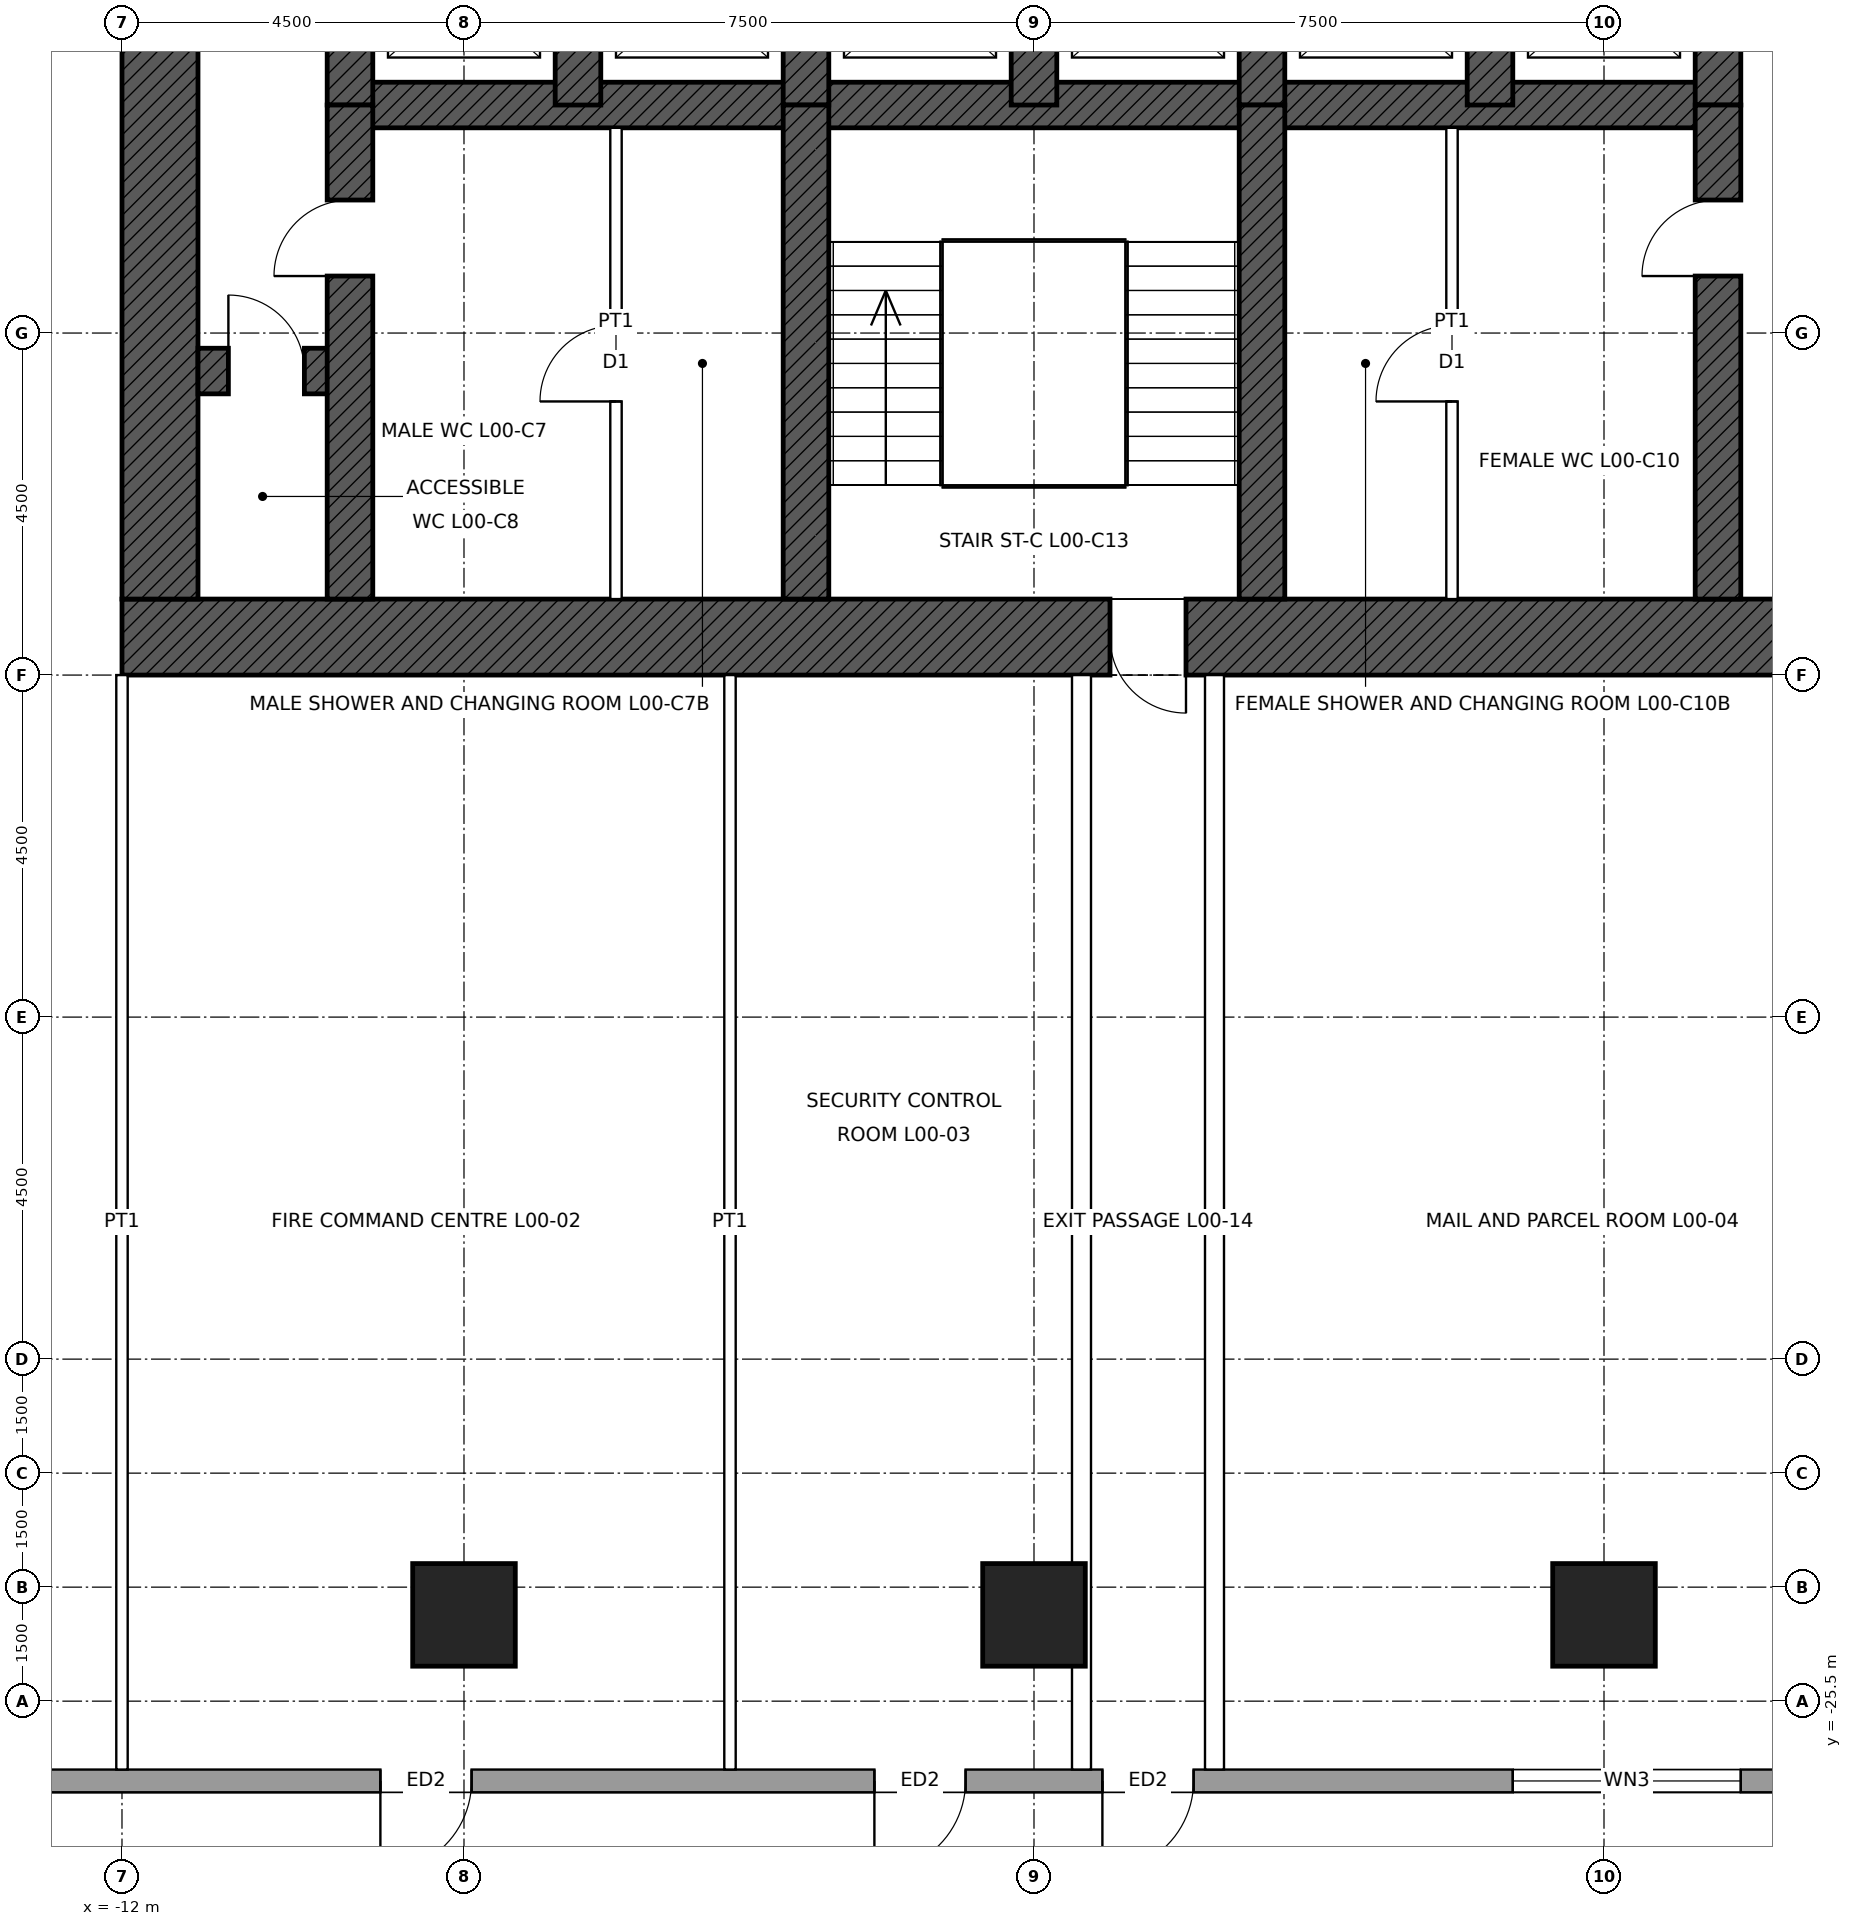
"""IFC4 building model, lengths in metres.
Left out: names, types, materials, properties, quantities, classifications, styles, units other than length and angle.
Written with IfcOpenShell. Run it as: python <this file> out.ifc"""

import sys

from ifc_helpers import new_model, si_unit, direction, frame, frame_2d, origin, origin_2d, place, context, subcontext, project, spatial, rectangle, hollow_rectangle, extrude, element, fill, save


model = new_model("IFC4")
c1 = context("Model", 3, precision=1e-05, world=origin(), true_north=direction((0.0, 1.0)))
c2 = subcontext(c1, "Body", "Model", "MODEL_VIEW")
j1 = project(units=[si_unit("LENGTHUNIT", "METRE"), si_unit("PLANEANGLEUNIT", "RADIAN")], contexts=[c1])
p1 = place(None, origin())
s1 = spatial("IfcSite", under=j1, at=p1, CompositionType="ELEMENT")
p2 = place(p1, origin())
s2 = spatial("IfcBuilding", under=s1, at=p2, CompositionType="ELEMENT")
p3 = place(p2, origin())
s3 = spatial("IfcBuildingStorey", under=s2, at=p3, CompositionType="ELEMENT", Elevation=0.0)
for number, where, z_axis, x_axis in (
    (1, (7.5, -24.365, -0.3), (0.0, 0.0, 1.0), (1.0, 0.0, 0.0)),
    (2, (0.0, -24.365, -0.3), (0.0, 0.0, 1.0), (1.0, 0.0, 0.0)),
    (3, (-7.5, -24.365, -0.3), (0.0, 0.0, 1.0), (1.0, 0.0, 0.0)),
):
    element("IfcColumn", number, at=place(p3, frame(where, z_axis=z_axis, x_axis=x_axis)), inside=s3, PredefinedType="COLUMN", context=c2, shape_type="SweptSolid", body=[
        extrude(hollow_rectangle(XDim=1.35, YDim=1.35, WallThickness=0.1, at=origin_2d()), origin(), (0.0, 0.0, 1.0), 7.5),
    ])
p4 = place(p3, frame((12.0, -11.5, -0.3), z_axis=(0.0, 0.0, 1.0), x_axis=(-1.0, 0.0, 0.0)))
e4 = element("IfcWall", 4, at=p4, inside=s3, PredefinedType="SHEAR", context=c2, shape_type="SweptSolid", body=[
    extrude(rectangle(XDim=24.0, YDim=1.0, at=frame_2d((12.0, 0.0))), origin(), (0.0, 0.0, 1.0), 7.5),
])
p5 = place(p4, frame((10.0, 0.0, 0.3)))
e5 = element("IfcOpeningElement", 5, at=p5, cuts=e4, PredefinedType="OPENING", context=c2, shape_type="SweptSolid", body=[
    extrude(rectangle(XDim=1.0, YDim=2.1, at=frame_2d((0.5, 1.05))), frame((0.0, 0.51, 0.0), z_axis=(0.0, -1.0, 0.0), x_axis=(1.0, 0.0, 0.0)), (0.0, 0.0, 1.0), 1.02),
])
p6 = place(p4, frame((1.0, 0.0, 0.3)))
e6 = element("IfcOpeningElement", 6, at=p6, cuts=e4, PredefinedType="OPENING", context=c2, shape_type="SweptSolid", body=[
    extrude(rectangle(XDim=1.0, YDim=2.4, at=frame_2d((0.5, 1.2))), frame((0.0, 0.51, 0.0), z_axis=(0.0, -1.0, 0.0), x_axis=(1.0, 0.0, 0.0)), (0.0, 0.0, 1.0), 1.02),
])
p7 = place(p3, frame((-11.5, -11.0, -0.3), z_axis=(0.0, 0.0, 1.0), x_axis=(0.0, 1.0, 0.0)))
e7 = element("IfcWall", 7, at=p7, inside=s3, PredefinedType="SHEAR", context=c2, shape_type="SweptSolid", body=[
    extrude(rectangle(XDim=22.0, YDim=1.0, at=frame_2d((11.0, 0.0))), origin(), (0.0, 0.0, 1.0), 7.5),
])
p8 = place(p7, frame((10.5, 0.0, 0.3)))
e8 = element("IfcOpeningElement", 8, at=p8, cuts=e7, PredefinedType="OPENING", context=c2, shape_type="SweptSolid", body=[
    extrude(rectangle(XDim=1.0, YDim=2.4, at=frame_2d((0.5, 1.2))), frame((0.0, 0.51, 0.0), z_axis=(0.0, -1.0, 0.0), x_axis=(1.0, 0.0, 0.0)), (0.0, 0.0, 1.0), 1.02),
])
p9 = place(p3, frame((-9.0, -4.5, -0.3), z_axis=(0.0, 0.0, 1.0), x_axis=(1.0, 0.0, 0.0)))
e9 = element("IfcWall", 9, at=p9, inside=s3, PredefinedType="SHEAR", context=c2, shape_type="SweptSolid", body=[
    extrude(rectangle(XDim=18.0, YDim=0.6, at=frame_2d((9.0, 0.0))), origin(), (0.0, 0.0, 1.0), 7.5),
])
p10 = place(p3, frame((-11.0, -8.0, -0.3), z_axis=(0.0, 0.0, 1.0), x_axis=(1.0, 0.0, 0.0)))
e10 = element("IfcWall", 10, at=p10, inside=s3, PredefinedType="SHEAR", context=c2, shape_type="SweptSolid", body=[
    extrude(rectangle(XDim=2.0, YDim=0.6, at=frame_2d((1.0, 0.0))), origin(), (0.0, 0.0, 1.0), 7.5),
])
p11 = place(p10, frame((0.4, 0.0, 0.3)))
e11 = element("IfcOpeningElement", 11, at=p11, cuts=e10, PredefinedType="OPENING", context=c2, shape_type="SweptSolid", body=[
    extrude(rectangle(XDim=1.0, YDim=2.1, at=frame_2d((0.5, 1.05))), frame((0.0, 0.31, 0.0), z_axis=(0.0, -1.0, 0.0), x_axis=(1.0, 0.0, 0.0)), (0.0, 0.0, 1.0), 0.62),
])
for number, where, z_axis, x_axis in (
    (12, (-9.0, -4.5, -0.3), (0.0, 0.0, 1.0), (0.0, 1.0, 0.0)),
    (13, (9.0, -4.5, -0.3), (0.0, 0.0, 1.0), (0.0, 1.0, 0.0)),
    (14, (-6.0, -4.5, -0.3), (0.0, 0.0, 1.0), (0.0, 1.0, 0.0)),
    (15, (-3.0, -4.5, -0.3), (0.0, 0.0, 1.0), (0.0, 1.0, 0.0)),
    (16, (0.0, -4.5, -0.3), (0.0, 0.0, 1.0), (0.0, 1.0, 0.0)),
    (17, (3.0, -4.5, -0.3), (0.0, 0.0, 1.0), (0.0, 1.0, 0.0)),
    (18, (6.0, -4.5, -0.3), (0.0, 0.0, 1.0), (0.0, 1.0, 0.0)),
):
    element("IfcWall", number, at=place(p3, frame(where, z_axis=z_axis, x_axis=x_axis)), inside=s3, PredefinedType="SHEAR", context=c2, shape_type="SweptSolid", body=[
        extrude(rectangle(XDim=3.0, YDim=0.6, at=frame_2d((1.5, 0.0))), origin(), (0.0, 0.0, 1.0), 7.5),
    ])
p12 = place(p3, frame((-9.0, -11.0, -0.3), z_axis=(0.0, 0.0, 1.0), x_axis=(0.0, 1.0, 0.0)))
e19 = element("IfcWall", 19, at=p12, inside=s3, PredefinedType="SHEAR", context=c2, shape_type="SweptSolid", body=[
    extrude(rectangle(XDim=6.5, YDim=0.6, at=frame_2d((3.25, 0.0))), origin(), (0.0, 0.0, 1.0), 7.5),
])
p13 = place(p12, frame((4.25, 0.0, 0.3)))
e20 = element("IfcOpeningElement", 20, at=p13, cuts=e19, PredefinedType="OPENING", context=c2, shape_type="SweptSolid", body=[
    extrude(rectangle(XDim=1.0, YDim=2.1, at=frame_2d((0.5, 1.05))), frame((0.0, 0.31, 0.0), z_axis=(0.0, -1.0, 0.0), x_axis=(1.0, 0.0, 0.0)), (0.0, 0.0, 1.0), 0.62),
])
p14 = place(p3, frame((9.0, -11.0, -0.3), z_axis=(0.0, 0.0, 1.0), x_axis=(0.0, 1.0, 0.0)))
e21 = element("IfcWall", 21, at=p14, inside=s3, PredefinedType="SHEAR", context=c2, shape_type="SweptSolid", body=[
    extrude(rectangle(XDim=6.5, YDim=0.6, at=frame_2d((3.25, 0.0))), origin(), (0.0, 0.0, 1.0), 7.5),
])
p15 = place(p14, frame((4.25, 0.0, 0.3)))
e22 = element("IfcOpeningElement", 22, at=p15, cuts=e21, PredefinedType="OPENING", context=c2, shape_type="SweptSolid", body=[
    extrude(rectangle(XDim=1.0, YDim=2.1, at=frame_2d((0.5, 1.05))), frame((0.0, 0.31, 0.0), z_axis=(0.0, -1.0, 0.0), x_axis=(1.0, 0.0, 0.0)), (0.0, 0.0, 1.0), 0.62),
])
for number, where, z_axis, x_axis in (
    (23, (-3.0, -11.0, -0.3), (0.0, 0.0, 1.0), (0.0, 1.0, 0.0)),
    (24, (3.0, -11.0, -0.3), (0.0, 0.0, 1.0), (0.0, 1.0, 0.0)),
):
    element("IfcWall", number, at=place(p3, frame(where, z_axis=z_axis, x_axis=x_axis)), inside=s3, PredefinedType="SHEAR", context=c2, shape_type="SweptSolid", body=[
        extrude(rectangle(XDim=6.5, YDim=0.6, at=frame_2d((3.25, 0.0))), origin(), (0.0, 0.0, 1.0), 7.5),
    ])
p16 = place(p3, frame((-24.1, -26.55, 0.0), z_axis=(0.0, 0.0, 1.0), x_axis=(1.0, 0.0, 0.0)))
e25 = element("IfcWall", 25, at=p16, inside=s3, PredefinedType="SOLIDWALL", context=c2, shape_type="SweptSolid", body=[
    extrude(rectangle(XDim=48.2, YDim=0.3, at=frame_2d((24.1, 0.0))), origin(), (0.0, 0.0, 1.0), 6.95),
])
p17 = place(p16, frame((15.5, 0.0, 0.0)))
e26 = element("IfcOpeningElement", 26, at=p17, cuts=e25, PredefinedType="OPENING", context=c2, shape_type="SweptSolid", body=[
    extrude(rectangle(XDim=1.2, YDim=2.4, at=frame_2d((0.6, 1.2))), frame((0.0, 0.16, 0.0), z_axis=(0.0, -1.0, 0.0), x_axis=(1.0, 0.0, 0.0)), (0.0, 0.0, 1.0), 0.32),
])
p18 = place(p16, frame((22.0, 0.0, 0.0)))
e27 = element("IfcOpeningElement", 27, at=p18, cuts=e25, PredefinedType="OPENING", context=c2, shape_type="SweptSolid", body=[
    extrude(rectangle(XDim=1.2, YDim=2.4, at=frame_2d((0.6, 1.2))), frame((0.0, 0.16, 0.0), z_axis=(0.0, -1.0, 0.0), x_axis=(1.0, 0.0, 0.0)), (0.0, 0.0, 1.0), 0.32),
])
p19 = place(p16, frame((25.0, 0.0, 0.0)))
e28 = element("IfcOpeningElement", 28, at=p19, cuts=e25, PredefinedType="OPENING", context=c2, shape_type="SweptSolid", body=[
    extrude(rectangle(XDim=1.2, YDim=2.4, at=frame_2d((0.6, 1.2))), frame((0.0, 0.16, 0.0), z_axis=(0.0, -1.0, 0.0), x_axis=(1.0, 0.0, 0.0)), (0.0, 0.0, 1.0), 0.32),
])
p20 = place(p16, frame((2.4, 0.0, 0.6)))
e29 = element("IfcOpeningElement", 29, at=p20, cuts=e25, PredefinedType="OPENING", context=c2, shape_type="SweptSolid", body=[
    extrude(rectangle(XDim=3.0, YDim=4.5, at=frame_2d((1.5, 2.25))), frame((0.0, 0.16, 0.0), z_axis=(0.0, -1.0, 0.0), x_axis=(1.0, 0.0, 0.0)), (0.0, 0.0, 1.0), 0.32),
])
p21 = place(p16, frame((6.4, 0.0, 0.6)))
e30 = element("IfcOpeningElement", 30, at=p21, cuts=e25, PredefinedType="OPENING", context=c2, shape_type="SweptSolid", body=[
    extrude(rectangle(XDim=3.0, YDim=4.5, at=frame_2d((1.5, 2.25))), frame((0.0, 0.16, 0.0), z_axis=(0.0, -1.0, 0.0), x_axis=(1.0, 0.0, 0.0)), (0.0, 0.0, 1.0), 0.32),
])
p22 = place(p16, frame((30.4, 0.0, 0.6)))
e31 = element("IfcOpeningElement", 31, at=p22, cuts=e25, PredefinedType="OPENING", context=c2, shape_type="SweptSolid", body=[
    extrude(rectangle(XDim=3.0, YDim=4.5, at=frame_2d((1.5, 2.25))), frame((0.0, 0.16, 0.0), z_axis=(0.0, -1.0, 0.0), x_axis=(1.0, 0.0, 0.0)), (0.0, 0.0, 1.0), 0.32),
])
p23 = place(p16, frame((38.4, 0.0, 0.6)))
e32 = element("IfcOpeningElement", 32, at=p23, cuts=e25, PredefinedType="OPENING", context=c2, shape_type="SweptSolid", body=[
    extrude(rectangle(XDim=3.0, YDim=4.5, at=frame_2d((1.5, 2.25))), frame((0.0, 0.16, 0.0), z_axis=(0.0, -1.0, 0.0), x_axis=(1.0, 0.0, 0.0)), (0.0, 0.0, 1.0), 0.32),
])
p24 = place(p16, frame((42.4, 0.0, 0.6)))
e33 = element("IfcOpeningElement", 33, at=p24, cuts=e25, PredefinedType="OPENING", context=c2, shape_type="SweptSolid", body=[
    extrude(rectangle(XDim=3.0, YDim=4.5, at=frame_2d((1.5, 2.25))), frame((0.0, 0.16, 0.0), z_axis=(0.0, -1.0, 0.0), x_axis=(1.0, 0.0, 0.0)), (0.0, 0.0, 1.0), 0.32),
])
for number, where, z_axis, x_axis in (
    (34, (-12.0, -12.0, 0.0), (0.0, 0.0, 1.0), (0.0, -1.0, 0.0)),
    (35, (-4.0, -12.0, 0.0), (0.0, 0.0, 1.0), (0.0, -1.0, 0.0)),
):
    element("IfcWall", number, at=place(p3, frame(where, z_axis=z_axis, x_axis=x_axis)), inside=s3, PredefinedType="PARTITIONING", context=c2, shape_type="SweptSolid", body=[
        extrude(rectangle(XDim=14.4, YDim=0.15, at=frame_2d((7.2, 0.0))), origin(), (0.0, 0.0, 1.0), 6.95),
    ])
p25 = place(p3, frame((-5.5, -11.0, 0.0), z_axis=(0.0, 0.0, 1.0), x_axis=(0.0, 1.0, 0.0)))
e36 = element("IfcWall", 36, at=p25, inside=s3, PredefinedType="PARTITIONING", context=c2, shape_type="SweptSolid", body=[
    extrude(rectangle(XDim=6.2, YDim=0.15, at=frame_2d((3.1, 0.0))), origin(), (0.0, 0.0, 1.0), 6.95),
])
p26 = place(p25, frame((2.6, 0.0, 0.0)))
e37 = element("IfcOpeningElement", 37, at=p26, cuts=e36, PredefinedType="OPENING", context=c2, shape_type="SweptSolid", body=[
    extrude(rectangle(XDim=1.0, YDim=2.1, at=frame_2d((0.5, 1.05))), frame((0.0, 0.085, 0.0), z_axis=(0.0, -1.0, 0.0), x_axis=(1.0, 0.0, 0.0)), (0.0, 0.0, 1.0), 0.17),
])
p27 = place(p3, frame((5.5, -11.0, 0.0), z_axis=(0.0, 0.0, 1.0), x_axis=(0.0, 1.0, 0.0)))
e38 = element("IfcWall", 38, at=p27, inside=s3, PredefinedType="PARTITIONING", context=c2, shape_type="SweptSolid", body=[
    extrude(rectangle(XDim=6.2, YDim=0.15, at=frame_2d((3.1, 0.0))), origin(), (0.0, 0.0, 1.0), 6.95),
])
p28 = place(p27, frame((2.6, 0.0, 0.0)))
e39 = element("IfcOpeningElement", 39, at=p28, cuts=e38, PredefinedType="OPENING", context=c2, shape_type="SweptSolid", body=[
    extrude(rectangle(XDim=1.0, YDim=2.1, at=frame_2d((0.5, 1.05))), frame((0.0, 0.085, 0.0), z_axis=(0.0, -1.0, 0.0), x_axis=(1.0, 0.0, 0.0)), (0.0, 0.0, 1.0), 0.17),
])
for number, where, z_axis, x_axis in (
    (40, (0.625, -12.0, 0.0), (0.0, 0.0, 1.0), (0.0, -1.0, 0.0)),
    (41, (2.375, -12.0, 0.0), (0.0, 0.0, 1.0), (0.0, -1.0, 0.0)),
):
    element("IfcWall", number, at=place(p3, frame(where, z_axis=z_axis, x_axis=x_axis)), inside=s3, PredefinedType="SOLIDWALL", context=c2, shape_type="SweptSolid", body=[
        extrude(rectangle(XDim=14.4, YDim=0.25, at=frame_2d((7.2, 0.0))), origin(), (0.0, 0.0, 1.0), 6.95),
    ])
p29 = place(p17, frame((1.2, 0.0, 0.0), z_axis=(0.0, 0.0, 1.0), x_axis=(-1.0, 0.0, 0.0)))
e42 = element("IfcDoor", 42, at=p29, inside=s3, OperationType="SINGLE_SWING_RIGHT", PredefinedType="DOOR", context=c2, shape_type="SweptSolid", body=[
    extrude(rectangle(XDim=1.2, YDim=2.4, at=frame_2d((0.6, 1.2))), frame((0.0, 0.025, 0.0), z_axis=(0.0, -1.0, 0.0), x_axis=(1.0, 0.0, 0.0)), (0.0, 0.0, 1.0), 0.05),
])
fill(e26, e42)
p30 = place(p18, frame((1.2, 0.0, 0.0), z_axis=(0.0, 0.0, 1.0), x_axis=(-1.0, 0.0, 0.0)))
e43 = element("IfcDoor", 43, at=p30, inside=s3, OperationType="SINGLE_SWING_RIGHT", PredefinedType="DOOR", context=c2, shape_type="SweptSolid", body=[
    extrude(rectangle(XDim=1.2, YDim=2.4, at=frame_2d((0.6, 1.2))), frame((0.0, 0.025, 0.0), z_axis=(0.0, -1.0, 0.0), x_axis=(1.0, 0.0, 0.0)), (0.0, 0.0, 1.0), 0.05),
])
fill(e27, e43)
p31 = place(p19, frame((1.2, 0.0, 0.0), z_axis=(0.0, 0.0, 1.0), x_axis=(-1.0, 0.0, 0.0)))
e44 = element("IfcDoor", 44, at=p31, inside=s3, OperationType="SINGLE_SWING_RIGHT", PredefinedType="DOOR", context=c2, shape_type="SweptSolid", body=[
    extrude(rectangle(XDim=1.2, YDim=2.4, at=frame_2d((0.6, 1.2))), frame((0.0, 0.025, 0.0), z_axis=(0.0, -1.0, 0.0), x_axis=(1.0, 0.0, 0.0)), (0.0, 0.0, 1.0), 0.05),
])
fill(e28, e44)
p32 = place(p22, origin())
e45 = element("IfcWindow", 45, at=p32, inside=s3, PartitioningType="SINGLE_PANEL", PredefinedType="WINDOW", context=c2, shape_type="SweptSolid", body=[
    extrude(rectangle(XDim=3.0, YDim=4.5, at=frame_2d((1.5, 2.25))), frame((0.0, 0.03, 0.0), z_axis=(0.0, -1.0, 0.0), x_axis=(1.0, 0.0, 0.0)), (0.0, 0.0, 1.0), 0.06),
])
fill(e31, e45)
p33 = place(p5, origin())
e46 = element("IfcDoor", 46, at=p33, inside=s3, OperationType="SINGLE_SWING_LEFT", PredefinedType="DOOR", context=c2, shape_type="SweptSolid", body=[
    extrude(rectangle(XDim=1.0, YDim=2.1, at=frame_2d((0.5, 1.05))), frame((0.0, 0.025, 0.0), z_axis=(0.0, -1.0, 0.0), x_axis=(1.0, 0.0, 0.0)), (0.0, 0.0, 1.0), 0.05),
])
fill(e5, e46)
p34 = place(p13, origin())
e47 = element("IfcDoor", 47, at=p34, inside=s3, OperationType="SINGLE_SWING_LEFT", PredefinedType="DOOR", context=c2, shape_type="SweptSolid", body=[
    extrude(rectangle(XDim=1.0, YDim=2.1, at=frame_2d((0.5, 1.05))), frame((0.0, 0.025, 0.0), z_axis=(0.0, -1.0, 0.0), x_axis=(1.0, 0.0, 0.0)), (0.0, 0.0, 1.0), 0.05),
])
fill(e20, e47)
p35 = place(p15, origin())
e48 = element("IfcDoor", 48, at=p35, inside=s3, OperationType="SINGLE_SWING_LEFT", PredefinedType="DOOR", context=c2, shape_type="SweptSolid", body=[
    extrude(rectangle(XDim=1.0, YDim=2.1, at=frame_2d((0.5, 1.05))), frame((0.0, 0.025, 0.0), z_axis=(0.0, -1.0, 0.0), x_axis=(1.0, 0.0, 0.0)), (0.0, 0.0, 1.0), 0.05),
])
fill(e22, e48)
p36 = place(p11, origin())
e49 = element("IfcDoor", 49, at=p36, inside=s3, OperationType="SINGLE_SWING_LEFT", PredefinedType="DOOR", context=c2, shape_type="SweptSolid", body=[
    extrude(rectangle(XDim=1.0, YDim=2.1, at=frame_2d((0.5, 1.05))), frame((0.0, 0.025, 0.0), z_axis=(0.0, -1.0, 0.0), x_axis=(1.0, 0.0, 0.0)), (0.0, 0.0, 1.0), 0.05),
])
fill(e11, e49)
p37 = place(p26, origin())
e50 = element("IfcDoor", 50, at=p37, inside=s3, OperationType="SINGLE_SWING_LEFT", PredefinedType="DOOR", context=c2, shape_type="SweptSolid", body=[
    extrude(rectangle(XDim=1.0, YDim=2.1, at=frame_2d((0.5, 1.05))), frame((0.0, 0.025, 0.0), z_axis=(0.0, -1.0, 0.0), x_axis=(1.0, 0.0, 0.0)), (0.0, 0.0, 1.0), 0.05),
])
fill(e37, e50)
p38 = place(p28, origin())
e51 = element("IfcDoor", 51, at=p38, inside=s3, OperationType="SINGLE_SWING_LEFT", PredefinedType="DOOR", context=c2, shape_type="SweptSolid", body=[
    extrude(rectangle(XDim=1.0, YDim=2.1, at=frame_2d((0.5, 1.05))), frame((0.0, 0.025, 0.0), z_axis=(0.0, -1.0, 0.0), x_axis=(1.0, 0.0, 0.0)), (0.0, 0.0, 1.0), 0.05),
])
fill(e39, e51)
save(model, sys.argv[1])
